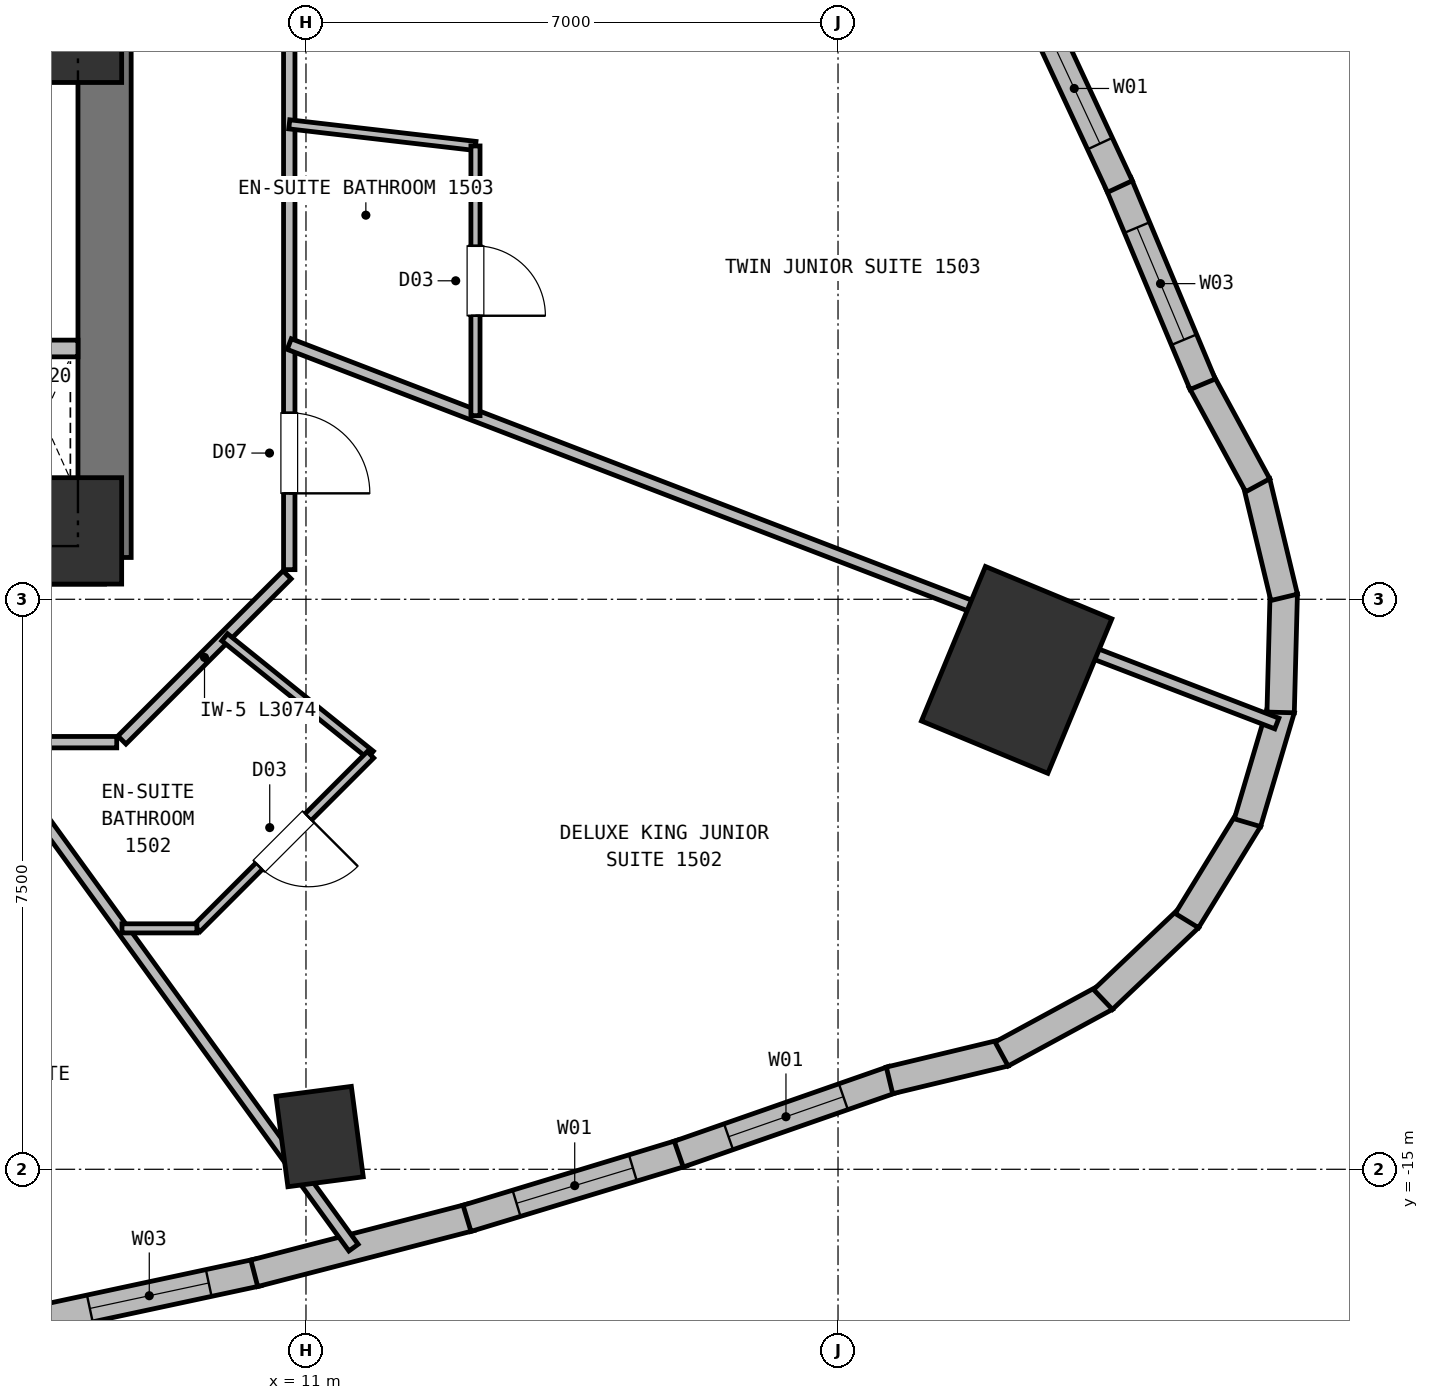
"""IFC4 building model, lengths in metres.
Left out: names, types, materials, properties, quantities, classifications, styles, units other than length and angle.
Written with IfcOpenShell. Run it as: python <this file> out.ifc"""

import sys

from ifc_helpers import new_model, si_unit, direction, frame, frame_2d, origin, origin_2d, place, context, subcontext, project, spatial, rectangle, extrude, element, fill, save


model = new_model("IFC4")
c1 = context("Model", 3, precision=1e-05, world=origin(), true_north=direction((0.0, 1.0)))
c2 = subcontext(c1, "Body", "Model", "MODEL_VIEW")
j1 = project(units=[si_unit("LENGTHUNIT", "METRE"), si_unit("PLANEANGLEUNIT", "RADIAN")], contexts=[c1])
p1 = place(None, origin())
s1 = spatial("IfcSite", under=j1, at=p1, CompositionType="ELEMENT")
p2 = place(p1, origin())
s2 = spatial("IfcBuilding", under=s1, at=p2, CompositionType="ELEMENT")
p3 = place(p2, frame((0.0, 0.0, 53.0)))
s3 = spatial("IfcBuildingStorey", under=s2, at=p3, CompositionType="ELEMENT", Elevation=53.0)
for number, where, z_axis, x_axis in (
    (1, (8.0, -6.6, 0.0), (0.0, 0.0, 1.0), (1.0, 0.0, 0.0)),
    (2, (8.0, 0.0, 0.0), (0.0, 0.0, 1.0), (1.0, 0.0, 0.0)),
):
    element("IfcColumn", number, at=place(p3, frame(where, z_axis=z_axis, x_axis=x_axis)), inside=s3, PredefinedType="COLUMN", context=c2, shape_type="SweptSolid", body=[
        extrude(rectangle(XDim=1.15, YDim=1.4, at=origin_2d()), origin(), (0.0, 0.0, 1.0), 3.75),
    ])
p4 = place(p3, frame((4.4, -6.95, 0.0), z_axis=(0.0, 0.0, 1.0), x_axis=(1.0, 0.0, 0.0)))
e3 = element("IfcWall", 3, at=p4, inside=s3, PredefinedType="SHEAR", context=c2, shape_type="SweptSolid", body=[
    extrude(rectangle(XDim=3.95, YDim=0.7, at=frame_2d((1.975, 0.0))), origin(), (0.0, 0.0, 1.0), 3.5),
])
p5 = place(p3, frame((8.35, -6.95, 0.0), z_axis=(0.0, 0.0, 1.0), x_axis=(0.0, 1.0, 0.0)))
e4 = element("IfcWall", 4, at=p5, inside=s3, PredefinedType="SHEAR", context=c2, shape_type="SweptSolid", body=[
    extrude(rectangle(XDim=8.1, YDim=0.7, at=frame_2d((4.05, 0.0))), origin(), (0.0, 0.0, 1.0), 3.5),
])
p6 = place(p3, frame((11.179, -14.569, 0.0), z_axis=(0.0, 0.0, 1.0), x_axis=(0.991444861374, 0.13052619222, 0.0)))
e5 = element("IfcColumn", 5, at=p6, inside=s3, PredefinedType="COLUMN", context=c2, shape_type="SweptSolid", body=[
    extrude(rectangle(XDim=1.0, YDim=1.2, at=origin_2d()), origin(), (0.0, 0.0, 1.0), 3.75),
])
p7 = place(p3, frame((20.35, -8.429, 0.0), z_axis=(0.0, 0.0, 1.0), x_axis=(-0.923879532511, 0.382683432365, 0.0)))
e6 = element("IfcColumn", 6, at=p7, inside=s3, PredefinedType="COLUMN", context=c2, shape_type="SweptSolid", body=[
    extrude(rectangle(XDim=1.8, YDim=2.2, at=origin_2d()), origin(), (0.0, 0.0, 1.0), 3.75),
])
p8 = place(p3, frame((10.368, -16.357, 0.0), z_axis=(0.0, 0.0, 1.0), x_axis=(-0.977791419792, -0.209580388826, 0.0)))
e7 = element("IfcWall", 7, at=p8, inside=s3, PredefinedType="SOLIDWALL", context=c2, shape_type="SweptSolid", body=[
    extrude(rectangle(XDim=2.925, YDim=0.36, at=frame_2d((1.462, 0.0))), origin(), (0.0, 0.0, 1.0), 3.5),
])
p9 = place(p8, frame((0.663, 0.0, 0.72)))
e8 = element("IfcOpeningElement", 8, at=p9, cuts=e7, PredefinedType="OPENING", context=c2, shape_type="SweptSolid", body=[
    extrude(rectangle(XDim=1.6, YDim=1.88, at=frame_2d((0.8, 0.94))), frame((0.0, 0.19, 0.0), z_axis=(0.0, -1.0, 0.0), x_axis=(1.0, 0.0, 0.0)), (0.0, 0.0, 1.0), 0.38),
])
p10 = place(p3, frame((13.167, -15.632, 0.0), z_axis=(0.0, 0.0, 1.0), x_axis=(-0.968087209766, -0.250613555675, 0.0)))
e9 = element("IfcWall", 9, at=p10, inside=s3, PredefinedType="SOLIDWALL", context=c2, shape_type="SweptSolid", body=[
    extrude(rectangle(XDim=2.941, YDim=0.36, at=frame_2d((1.47, 0.0))), origin(), (0.0, 0.0, 1.0), 3.5),
])
p11 = place(p3, frame((15.952, -14.785, 0.0), z_axis=(0.0, 0.0, 1.0), x_axis=(-0.956863387773, -0.290538219758, 0.0)))
e10 = element("IfcWall", 10, at=p11, inside=s3, PredefinedType="SOLIDWALL", context=c2, shape_type="SweptSolid", body=[
    extrude(rectangle(XDim=2.961, YDim=0.36, at=frame_2d((1.48, 0.0))), origin(), (0.0, 0.0, 1.0), 3.5),
])
p12 = place(p11, frame((0.681, 0.0, 0.72)))
e11 = element("IfcOpeningElement", 11, at=p12, cuts=e10, PredefinedType="OPENING", context=c2, shape_type="SweptSolid", body=[
    extrude(rectangle(XDim=1.6, YDim=1.88, at=frame_2d((0.8, 0.94))), frame((0.0, 0.19, 0.0), z_axis=(0.0, -1.0, 0.0), x_axis=(1.0, 0.0, 0.0)), (0.0, 0.0, 1.0), 0.38),
])
p13 = place(p3, frame((18.725, -13.817, 0.0), z_axis=(0.0, 0.0, 1.0), x_axis=(-0.944210822491, -0.329341650404, 0.0)))
e12 = element("IfcWall", 12, at=p13, inside=s3, PredefinedType="SOLIDWALL", context=c2, shape_type="SweptSolid", body=[
    extrude(rectangle(XDim=2.987, YDim=0.36, at=frame_2d((1.493, 0.0))), origin(), (0.0, 0.0, 1.0), 3.5),
])
p14 = place(p13, frame((0.694, 0.0, 0.72)))
e13 = element("IfcOpeningElement", 13, at=p14, cuts=e12, PredefinedType="OPENING", context=c2, shape_type="SweptSolid", body=[
    extrude(rectangle(XDim=1.6, YDim=1.88, at=frame_2d((0.8, 0.94))), frame((0.0, 0.19, 0.0), z_axis=(0.0, -1.0, 0.0), x_axis=(1.0, 0.0, 0.0)), (0.0, 0.0, 1.0), 0.38),
])
for number, where, z_axis, x_axis in (
    (14, (20.198, -13.466, 0.0), (0.0, 0.0, 1.0), (-0.972, -0.233, 0.0)),
    (15, (21.527, -12.737, 0.0), (0.0, 0.0, 1.0), (-0.879, -0.477, 0.0)),
):
    element("IfcWall", number, at=place(p3, frame(where, z_axis=z_axis, x_axis=x_axis)), inside=s3, PredefinedType="SOLIDWALL", context=c2, shape_type="SweptSolid", body=[
        extrude(rectangle(XDim=1.564, YDim=0.36, at=frame_2d((0.782, 0.0))), origin(), (0.0, 0.0, 1.0), 3.5),
    ])
for number, where, z_axis, x_axis in (
    (16, (22.621, -11.689, 0.0), (0.0, 0.0, 1.0), (-0.725, -0.688, 0.0)),
    (17, (23.407, -10.394, 0.0), (0.0, 0.0, 1.0), (-0.523, -0.853, 0.0)),
):
    element("IfcWall", number, at=place(p3, frame(where, z_axis=z_axis, x_axis=x_axis)), inside=s3, PredefinedType="SOLIDWALL", context=c2, shape_type="SweptSolid", body=[
        extrude(rectangle(XDim=1.564, YDim=0.36, at=frame_2d((0.782, 0.0))), origin(), (0.0, 0.0, 1.0), 3.5),
    ])
for number, where, z_axis, x_axis in (
    (18, (23.831, -8.94, 0.0), (0.0, 0.0, 1.0), (-0.284, -0.959, 0.0)),
    (19, (23.864, -7.425, 0.0), (0.0, 0.0, 1.0), (-0.026, -1.0, 0.0)),
    (20, (23.504, -5.954, 0.0), (0.0, 0.0, 1.0), (0.233, -0.972, 0.0)),
):
    element("IfcWall", number, at=place(p3, frame(where, z_axis=z_axis, x_axis=x_axis)), inside=s3, PredefinedType="SOLIDWALL", context=c2, shape_type="SweptSolid", body=[
        extrude(rectangle(XDim=1.564, YDim=0.36, at=frame_2d((0.782, 0.0))), origin(), (0.0, 0.0, 1.0), 3.5),
    ])
p15 = place(p3, frame((22.776, -4.625, 0.0), z_axis=(0.0, 0.0, 1.0), x_axis=(0.477057413098, -0.878872132115, 0.0)))
e21 = element("IfcWall", 21, at=p15, inside=s3, PredefinedType="SOLIDWALL", context=c2, shape_type="SweptSolid", body=[
    extrude(rectangle(XDim=1.564, YDim=0.36, at=frame_2d((0.782, 0.0))), origin(), (0.0, 0.0, 1.0), 3.5),
])
p16 = place(p3, frame((21.689, -2.023, 0.0), z_axis=(0.0, 0.0, 1.0), x_axis=(0.386287899082, -0.922378262441, 0.0)))
e22 = element("IfcWall", 22, at=p16, inside=s3, PredefinedType="SOLIDWALL", context=c2, shape_type="SweptSolid", body=[
    extrude(rectangle(XDim=2.87, YDim=0.36, at=frame_2d((1.435, 0.0))), origin(), (0.0, 0.0, 1.0), 3.5),
])
p17 = place(p16, frame((0.635, 0.0, 0.72)))
e23 = element("IfcOpeningElement", 23, at=p17, cuts=e22, PredefinedType="OPENING", context=c2, shape_type="SweptSolid", body=[
    extrude(rectangle(XDim=1.6, YDim=1.88, at=frame_2d((0.8, 0.94))), frame((0.0, 0.19, 0.0), z_axis=(0.0, -1.0, 0.0), x_axis=(1.0, 0.0, 0.0)), (0.0, 0.0, 1.0), 0.38),
])
p18 = place(p3, frame((20.507, 0.511, 0.0), z_axis=(0.0, 0.0, 1.0), x_axis=(0.422134095938, -0.906533399851, 0.0)))
e24 = element("IfcWall", 24, at=p18, inside=s3, PredefinedType="SOLIDWALL", context=c2, shape_type="SweptSolid", body=[
    extrude(rectangle(XDim=2.847, YDim=0.36, at=frame_2d((1.423, 0.0))), origin(), (0.0, 0.0, 1.0), 3.5),
])
p19 = place(p18, frame((0.623, 0.0, 0.72)))
e25 = element("IfcOpeningElement", 25, at=p19, cuts=e24, PredefinedType="OPENING", context=c2, shape_type="SweptSolid", body=[
    extrude(rectangle(XDim=1.6, YDim=1.88, at=frame_2d((0.8, 0.94))), frame((0.0, 0.19, 0.0), z_axis=(0.0, -1.0, 0.0), x_axis=(1.0, 0.0, 0.0)), (0.0, 0.0, 1.0), 0.38),
])
p20 = place(p3, frame((7.09, -4.2, 0.0), z_axis=(0.0, 0.0, 1.0), x_axis=(1.0, 0.0, 0.0)))
e26 = element("IfcWall", 26, at=p20, inside=s3, PredefinedType="PARTITIONING", context=c2, shape_type="SweptSolid", body=[
    extrude(rectangle(XDim=0.91, YDim=0.22, at=frame_2d((0.455, 0.0))), origin(), (0.0, 0.0, 1.0), 3.5),
])
p21 = place(p3, frame((8.51, -9.38, 0.0), z_axis=(0.0, 0.0, 1.0), x_axis=(-1.0, 0.0, 0.0)))
e27 = element("IfcWall", 27, at=p21, inside=s3, PredefinedType="PARTITIONING", context=c2, shape_type="SweptSolid", body=[
    extrude(rectangle(XDim=17.02, YDim=0.15, at=frame_2d((8.51, 0.0))), origin(), (0.0, 0.0, 1.0), 3.5),
])
p22 = place(p21, frame((8.419, 0.0, 0.0)))
e28 = element("IfcOpeningElement", 28, at=p22, cuts=e27, PredefinedType="OPENING", context=c2, shape_type="SweptSolid", body=[
    extrude(rectangle(XDim=0.95, YDim=2.1, at=frame_2d((0.475, 1.05))), frame((0.0, 0.085, 0.0), z_axis=(0.0, -1.0, 0.0), x_axis=(1.0, 0.0, 0.0)), (0.0, 0.0, 1.0), 0.17),
])
p23 = place(p21, frame((10.488, 0.0, 0.0)))
e29 = element("IfcOpeningElement", 29, at=p23, cuts=e27, PredefinedType="OPENING", context=c2, shape_type="SweptSolid", body=[
    extrude(rectangle(XDim=1.0, YDim=2.15, at=frame_2d((0.5, 1.075))), frame((0.0, 0.085, 0.0), z_axis=(0.0, -1.0, 0.0), x_axis=(1.0, 0.0, 0.0)), (0.0, 0.0, 1.0), 0.17),
])
p24 = place(p21, frame((3.015, 0.0, 0.0)))
e30 = element("IfcOpeningElement", 30, at=p24, cuts=e27, PredefinedType="OPENING", context=c2, shape_type="SweptSolid", body=[
    extrude(rectangle(XDim=1.06, YDim=2.15, at=frame_2d((0.53, 1.075))), frame((0.0, 0.085, 0.0), z_axis=(0.0, -1.0, 0.0), x_axis=(1.0, 0.0, 0.0)), (0.0, 0.0, 1.0), 0.17),
])
p25 = place(p21, frame((13.209, 0.0, 0.0)))
e31 = element("IfcOpeningElement", 31, at=p25, cuts=e27, PredefinedType="OPENING", context=c2, shape_type="SweptSolid", body=[
    extrude(rectangle(XDim=1.06, YDim=2.15, at=frame_2d((0.53, 1.075))), frame((0.0, 0.085, 0.0), z_axis=(0.0, -1.0, 0.0), x_axis=(1.0, 0.0, 0.0)), (0.0, 0.0, 1.0), 0.17),
])
p26 = place(p3, frame((10.752, -7.178, 0.0), z_axis=(0.0, 0.0, 1.0), x_axis=(-0.707067066127, -0.707146494016, 0.0)))
e32 = element("IfcWall", 32, at=p26, inside=s3, PredefinedType="PARTITIONING", context=c2, shape_type="SweptSolid", body=[
    extrude(rectangle(XDim=3.074, YDim=0.15, at=frame_2d((1.537, 0.0))), origin(), (0.0, 0.0, 1.0), 3.12),
])
p27 = place(p3, frame((10.78, 7.11, 0.0), z_axis=(0.0, 0.0, 1.0), x_axis=(0.0, -1.0, 0.0)))
e33 = element("IfcWall", 33, at=p27, inside=s3, PredefinedType="PARTITIONING", context=c2, shape_type="SweptSolid", body=[
    extrude(rectangle(XDim=14.22, YDim=0.15, at=frame_2d((7.11, 0.0))), origin(), (0.0, 0.0, 1.0), 3.12),
])
p28 = place(p27, frame((2.217, 0.0, 0.0)))
e34 = element("IfcOpeningElement", 34, at=p28, cuts=e33, PredefinedType="OPENING", context=c2, shape_type="SweptSolid", body=[
    extrude(rectangle(XDim=1.0, YDim=2.15, at=frame_2d((0.5, 1.075))), frame((0.0, 0.085, 0.0), z_axis=(0.0, -1.0, 0.0), x_axis=(1.0, 0.0, 0.0)), (0.0, 0.0, 1.0), 0.17),
])
p29 = place(p27, frame((6.276, 0.0, 0.0)))
e35 = element("IfcOpeningElement", 35, at=p29, cuts=e33, PredefinedType="OPENING", context=c2, shape_type="SweptSolid", body=[
    extrude(rectangle(XDim=1.06, YDim=2.15, at=frame_2d((0.53, 1.075))), frame((0.0, 0.085, 0.0), z_axis=(0.0, -1.0, 0.0), x_axis=(1.0, 0.0, 0.0)), (0.0, 0.0, 1.0), 0.17),
])
p30 = place(p27, frame((12.156, 0.0, 0.0)))
e36 = element("IfcOpeningElement", 36, at=p30, cuts=e33, PredefinedType="OPENING", context=c2, shape_type="SweptSolid", body=[
    extrude(rectangle(XDim=1.06, YDim=2.15, at=frame_2d((0.53, 1.075))), frame((0.0, 0.085, 0.0), z_axis=(0.0, -1.0, 0.0), x_axis=(1.0, 0.0, 0.0)), (0.0, 0.0, 1.0), 0.17),
])
p31 = place(p3, frame((6.802, -9.38, 0.0), z_axis=(0.0, 0.0, 1.0), x_axis=(0.587056194983, -0.80954618394, 0.0)))
e37 = element("IfcWall", 37, at=p31, inside=s3, PredefinedType="PARTITIONING", context=c2, shape_type="SweptSolid", body=[
    extrude(rectangle(XDim=8.216, YDim=0.15, at=frame_2d((4.108, 0.0))), origin(), (0.0, 0.0, 1.0), 3.5),
])
p32 = place(p3, frame((9.93, -8.0, 0.0), z_axis=(0.0, 0.0, 1.0), x_axis=(0.778737774775, -0.627349566142, 0.0)))
e38 = element("IfcWall", 38, at=p32, inside=s3, PredefinedType="PARTITIONING", context=c2, shape_type="SweptSolid", body=[
    extrude(rectangle(XDim=2.464, YDim=0.12, at=frame_2d((1.232, 0.0))), origin(), (0.0, 0.0, 1.0), 3.5),
])
p33 = place(p3, frame((11.849, -9.546, 0.0), z_axis=(0.0, 0.0, 1.0), x_axis=(-0.707144567105, -0.707068993249, 0.0)))
e39 = element("IfcWall", 39, at=p33, inside=s3, PredefinedType="PARTITIONING", context=c2, shape_type="SweptSolid", body=[
    extrude(rectangle(XDim=3.23, YDim=0.12, at=frame_2d((1.615, 0.0))), origin(), (0.0, 0.0, 1.0), 3.5),
])
p34 = place(p33, frame((1.155, 0.0, 0.0)))
e40 = element("IfcOpeningElement", 40, at=p34, cuts=e39, PredefinedType="OPENING", context=c2, shape_type="SweptSolid", body=[
    extrude(rectangle(XDim=0.92, YDim=2.1, at=frame_2d((0.46, 1.05))), frame((0.0, 0.07, 0.0), z_axis=(0.0, -1.0, 0.0), x_axis=(1.0, 0.0, 0.0)), (0.0, 0.0, 1.0), 0.14),
])
p35 = place(p3, frame((8.579, -11.83, 0.0), z_axis=(0.0, 0.0, 1.0), x_axis=(1.0, 0.0, 0.0)))
e41 = element("IfcWall", 41, at=p35, inside=s3, PredefinedType="PARTITIONING", context=c2, shape_type="SweptSolid", body=[
    extrude(rectangle(XDim=0.986, YDim=0.12, at=frame_2d((0.493, 0.0))), origin(), (0.0, 0.0, 1.0), 3.5),
])
p36 = place(p3, frame((10.78, -4.142, 0.0), z_axis=(0.0, 0.0, 1.0), x_axis=(0.933466701783, -0.358664072166, 0.0)))
e42 = element("IfcWall", 42, at=p36, inside=s3, PredefinedType="PARTITIONING", context=c2, shape_type="SweptSolid", body=[
    extrude(rectangle(XDim=13.919, YDim=0.15, at=frame_2d((6.96, 0.0))), origin(), (0.0, 0.0, 1.0), 3.5),
])
p37 = place(p3, frame((13.23, -1.535, 0.0), z_axis=(0.0, 0.0, 1.0), x_axis=(-0.993328492048, 0.115319152291, 0.0)))
e43 = element("IfcWall", 43, at=p37, inside=s3, PredefinedType="PARTITIONING", context=c2, shape_type="SweptSolid", body=[
    extrude(rectangle(XDim=2.466, YDim=0.12, at=frame_2d((1.233, 0.0))), origin(), (0.0, 0.0, 1.0), 3.5),
])
p38 = place(p3, frame((13.23, -1.535, 0.0), z_axis=(0.0, 0.0, 1.0), x_axis=(0.0, -1.0, 0.0)))
e44 = element("IfcWall", 44, at=p38, inside=s3, PredefinedType="PARTITIONING", context=c2, shape_type="SweptSolid", body=[
    extrude(rectangle(XDim=3.548, YDim=0.12, at=frame_2d((1.774, 0.0))), origin(), (0.0, 0.0, 1.0), 3.5),
])
p39 = place(p38, frame((1.314, 0.0, 0.0)))
e45 = element("IfcOpeningElement", 45, at=p39, cuts=e44, PredefinedType="OPENING", context=c2, shape_type="SweptSolid", body=[
    extrude(rectangle(XDim=0.92, YDim=2.1, at=frame_2d((0.46, 1.05))), frame((0.0, 0.07, 0.0), z_axis=(0.0, -1.0, 0.0), x_axis=(1.0, 0.0, 0.0)), (0.0, 0.0, 1.0), 0.14),
])
p40 = place(p9, origin())
e46 = element("IfcWindow", 46, at=p40, inside=s3, PartitioningType="SINGLE_PANEL", PredefinedType="WINDOW", context=c2, shape_type="SweptSolid", body=[
    extrude(rectangle(XDim=1.6, YDim=1.88, at=frame_2d((0.8, 0.94))), frame((0.0, 0.03, 0.0), z_axis=(0.0, -1.0, 0.0), x_axis=(1.0, 0.0, 0.0)), (0.0, 0.0, 1.0), 0.06),
])
fill(e8, e46)
p41 = place(p12, origin())
e47 = element("IfcWindow", 47, at=p41, inside=s3, PartitioningType="SINGLE_PANEL", PredefinedType="WINDOW", context=c2, shape_type="SweptSolid", body=[
    extrude(rectangle(XDim=1.6, YDim=1.88, at=frame_2d((0.8, 0.94))), frame((0.0, 0.03, 0.0), z_axis=(0.0, -1.0, 0.0), x_axis=(1.0, 0.0, 0.0)), (0.0, 0.0, 1.0), 0.06),
])
fill(e11, e47)
p42 = place(p14, origin())
e48 = element("IfcWindow", 48, at=p42, inside=s3, PartitioningType="SINGLE_PANEL", PredefinedType="WINDOW", context=c2, shape_type="SweptSolid", body=[
    extrude(rectangle(XDim=1.6, YDim=1.88, at=frame_2d((0.8, 0.94))), frame((0.0, 0.03, 0.0), z_axis=(0.0, -1.0, 0.0), x_axis=(1.0, 0.0, 0.0)), (0.0, 0.0, 1.0), 0.06),
])
fill(e13, e48)
p43 = place(p17, origin())
e49 = element("IfcWindow", 49, at=p43, inside=s3, PartitioningType="SINGLE_PANEL", PredefinedType="WINDOW", context=c2, shape_type="SweptSolid", body=[
    extrude(rectangle(XDim=1.6, YDim=1.88, at=frame_2d((0.8, 0.94))), frame((0.0, 0.03, 0.0), z_axis=(0.0, -1.0, 0.0), x_axis=(1.0, 0.0, 0.0)), (0.0, 0.0, 1.0), 0.06),
])
fill(e23, e49)
p44 = place(p19, origin())
e50 = element("IfcWindow", 50, at=p44, inside=s3, PartitioningType="SINGLE_PANEL", PredefinedType="WINDOW", context=c2, shape_type="SweptSolid", body=[
    extrude(rectangle(XDim=1.6, YDim=1.88, at=frame_2d((0.8, 0.94))), frame((0.0, 0.03, 0.0), z_axis=(0.0, -1.0, 0.0), x_axis=(1.0, 0.0, 0.0)), (0.0, 0.0, 1.0), 0.06),
])
fill(e25, e50)
p45 = place(p34, origin())
e51 = element("IfcDoor", 51, at=p45, inside=s3, OperationType="SINGLE_SWING_LEFT", PredefinedType="DOOR", context=c2, shape_type="SweptSolid", body=[
    extrude(rectangle(XDim=0.92, YDim=2.1, at=frame_2d((0.46, 1.05))), frame((0.0, 0.025, 0.0), z_axis=(0.0, -1.0, 0.0), x_axis=(1.0, 0.0, 0.0)), (0.0, 0.0, 1.0), 0.05),
])
fill(e40, e51)
p46 = place(p39, origin())
e52 = element("IfcDoor", 52, at=p46, inside=s3, OperationType="SINGLE_SWING_RIGHT", PredefinedType="DOOR", context=c2, shape_type="SweptSolid", body=[
    extrude(rectangle(XDim=0.92, YDim=2.1, at=frame_2d((0.46, 1.05))), frame((0.0, 0.025, 0.0), z_axis=(0.0, -1.0, 0.0), x_axis=(1.0, 0.0, 0.0)), (0.0, 0.0, 1.0), 0.05),
])
fill(e45, e52)
p47 = place(p30, origin())
e53 = element("IfcDoor", 53, at=p47, inside=s3, OperationType="SINGLE_SWING_RIGHT", PredefinedType="DOOR", context=c2, shape_type="SweptSolid", body=[
    extrude(rectangle(XDim=1.06, YDim=2.15, at=frame_2d((0.53, 1.075))), frame((0.0, 0.025, 0.0), z_axis=(0.0, -1.0, 0.0), x_axis=(1.0, 0.0, 0.0)), (0.0, 0.0, 1.0), 0.05),
])
fill(e36, e53)
save(model, sys.argv[1])
